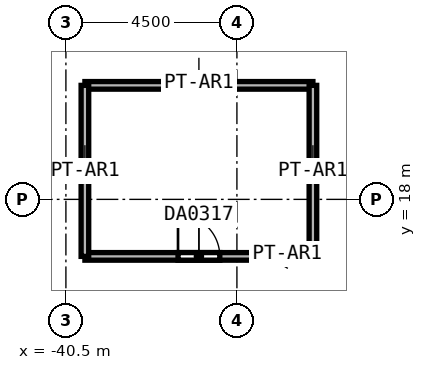
"""IFC4 building model, lengths in metres.
Left out: names, types, materials, properties, quantities, classifications, styles, units other than length and angle.
Written with IfcOpenShell. Run it as: python <this file> out.ifc"""

import sys

from ifc_helpers import new_model, si_unit, direction, frame, frame_2d, origin, place, context, subcontext, project, spatial, rectangle, extrude, element, fill, save


model = new_model("IFC4")
c1 = context("Model", 3, precision=1e-05, world=origin(), true_north=direction((0.0, 1.0)))
c2 = subcontext(c1, "Body", "Model", "MODEL_VIEW")
j1 = project(units=[si_unit("LENGTHUNIT", "METRE"), si_unit("PLANEANGLEUNIT", "RADIAN")], contexts=[c1])
p1 = place(None, origin())
s1 = spatial("IfcSite", under=j1, at=p1, CompositionType="ELEMENT")
p2 = place(p1, origin())
s2 = spatial("IfcBuilding", under=s1, at=p2, CompositionType="ELEMENT")
p3 = place(p2, origin())
s3 = spatial("IfcBuildingStorey", under=s2, at=p3, CompositionType="ELEMENT", Elevation=0.0)
p4 = place(p3, frame((-40.0, 16.5, 0.0), z_axis=(0.0, 0.0, 1.0), x_axis=(1.0, 0.0, 0.0)))
e1 = element("IfcWall", 1, at=p4, inside=s3, PredefinedType="PARTITIONING", context=c2, shape_type="SweptSolid", body=[
    extrude(rectangle(XDim=6.0, YDim=0.2, at=frame_2d((3.0, 0.0))), origin(), (0.0, 0.0, 1.0), 11.7),
])
p5 = place(p4, frame((2.45, 0.0, 0.0)))
e2 = element("IfcOpeningElement", 2, at=p5, cuts=e1, PredefinedType="OPENING", context=c2, shape_type="SweptSolid", body=[
    extrude(rectangle(XDim=1.1, YDim=2.4, at=frame_2d((0.55, 1.2))), frame((0.0, 0.1, 0.0), z_axis=(0.0, -1.0, 0.0), x_axis=(1.0, 0.0, 0.0)), (0.0, 0.0, 1.0), 0.2),
])
p6 = place(p3, frame((-34.0, 21.0, 0.0), z_axis=(0.0, 0.0, 1.0), x_axis=(-1.0, 0.0, 0.0)))
e3 = element("IfcWall", 3, at=p6, inside=s3, PredefinedType="PARTITIONING", context=c2, shape_type="SweptSolid", body=[
    extrude(rectangle(XDim=6.0, YDim=0.2, at=frame_2d((3.0, 0.0))), origin(), (0.0, 0.0, 1.0), 11.7),
])
for number, where, z_axis, x_axis in (
    (4, (-40.0, 21.0, 0.0), (0.0, 0.0, 1.0), (0.0, -1.0, 0.0)),
    (5, (-34.0, 16.5, 0.0), (0.0, 0.0, 1.0), (0.0, 1.0, 0.0)),
):
    element("IfcWall", number, at=place(p3, frame(where, z_axis=z_axis, x_axis=x_axis)), inside=s3, PredefinedType="PARTITIONING", context=c2, shape_type="SweptSolid", body=[
        extrude(rectangle(XDim=4.5, YDim=0.2, at=frame_2d((2.25, 0.0))), origin(), (0.0, 0.0, 1.0), 11.7),
    ])
p7 = place(p5, origin())
e6 = element("IfcDoor", 6, at=p7, inside=s3, OperationType="DOUBLE_DOOR_SINGLE_SWING", PredefinedType="DOOR", context=c2, shape_type="SweptSolid", body=[
    extrude(rectangle(XDim=1.1, YDim=2.4, at=frame_2d((0.55, 1.2))), frame((0.0, 0.025, 0.0), z_axis=(0.0, -1.0, 0.0), x_axis=(1.0, 0.0, 0.0)), (0.0, 0.0, 1.0), 0.05),
])
fill(e2, e6)
save(model, sys.argv[1])
